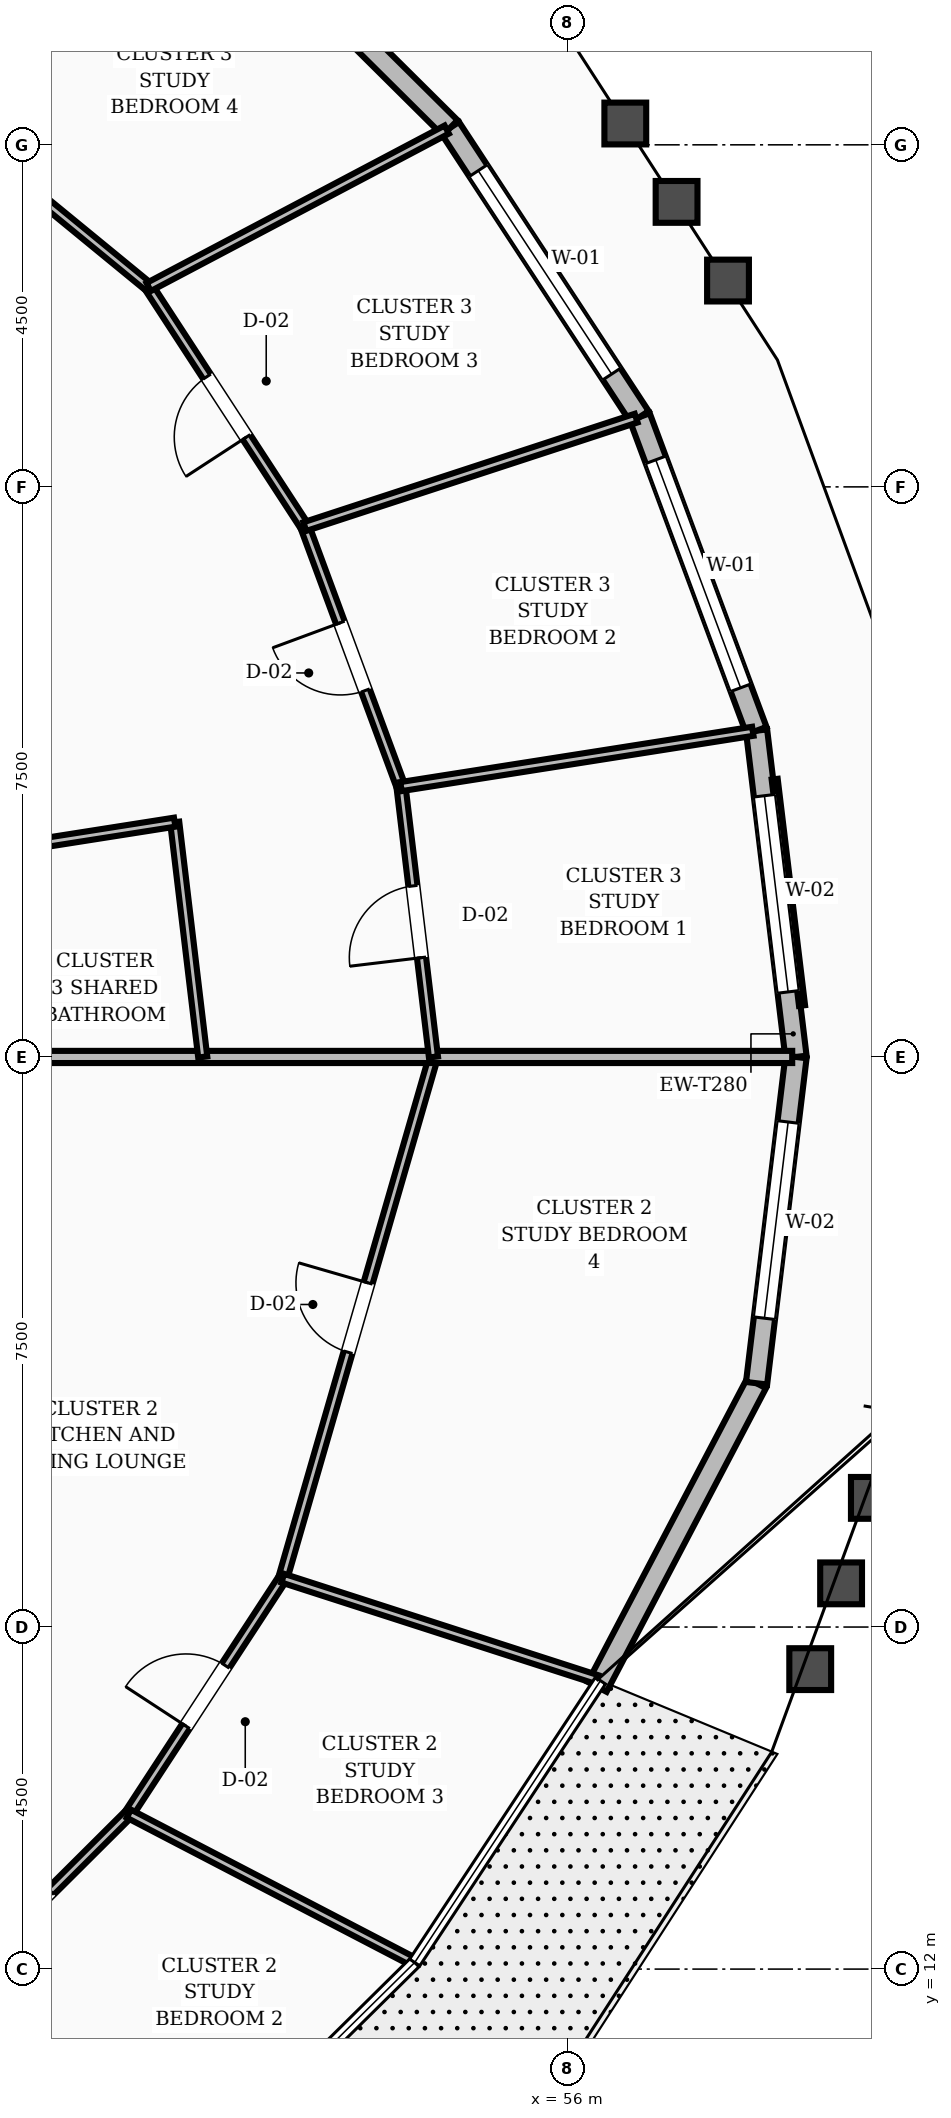
"""IFC4 building model, lengths in metres.
Left out: names, types, materials, properties, quantities, classifications, styles, units other than length and angle.
Written with IfcOpenShell. Run it as: python <this file> out.ifc"""

import sys

from ifc_helpers import new_model, si_unit, direction, frame, frame_2d, origin, place, context, subcontext, project, spatial, rectangle, extrude, element, fill, save


model = new_model("IFC4")
c1 = context("Model", 3, precision=1e-05, world=origin(), true_north=direction((0.0, 1.0)))
c2 = subcontext(c1, "Body", "Model", "MODEL_VIEW")
j1 = project(units=[si_unit("LENGTHUNIT", "METRE"), si_unit("PLANEANGLEUNIT", "RADIAN")], contexts=[c1])
p1 = place(None, origin())
s1 = spatial("IfcSite", under=j1, at=p1, CompositionType="ELEMENT")
p2 = place(p1, origin())
s2 = spatial("IfcBuilding", under=s1, at=p2, CompositionType="ELEMENT")
p3 = place(p2, frame((0.0, 0.0, 73.6)))
s3 = spatial("IfcBuildingStorey", under=s2, at=p3, CompositionType="ELEMENT", Elevation=73.6)
p4 = place(p3, frame((59.002, 24.0, 0.0), z_axis=(0.0, 0.0, 1.0), x_axis=(-0.119989041881, 0.992775216164, 0.0)))
e1 = element("IfcWall", 1, at=p4, inside=s3, PredefinedType="STANDARD", context=c2, shape_type="SweptSolid", body=[
    extrude(rectangle(XDim=4.324, YDim=0.28, at=frame_2d((2.162, 0.0))), origin(), (0.0, 0.0, 1.0), 2.71),
])
p5 = place(p4, frame((0.862, 0.0, 0.8)))
e2 = element("IfcOpeningElement", 2, at=p5, cuts=e1, PredefinedType="OPENING", context=c2, shape_type="SweptSolid", body=[
    extrude(rectangle(XDim=2.6, YDim=1.65, at=frame_2d((1.3, 0.825))), frame((0.0, 0.15, 0.0), z_axis=(0.0, -1.0, 0.0), x_axis=(1.0, 0.0, 0.0)), (0.0, 0.0, 1.0), 0.3),
])
p6 = place(p3, frame((58.484, 28.292, 0.0), z_axis=(0.0, 0.0, 1.0), x_axis=(-0.348899033007, 0.937160319672, 0.0)))
e3 = element("IfcWall", 3, at=p6, inside=s3, PredefinedType="STANDARD", context=c2, shape_type="SweptSolid", body=[
    extrude(rectangle(XDim=4.404, YDim=0.28, at=frame_2d((2.202, 0.0))), origin(), (0.0, 0.0, 1.0), 2.71),
])
p7 = place(p6, frame((0.602, 0.0, 0.8)))
e4 = element("IfcOpeningElement", 4, at=p7, cuts=e3, PredefinedType="OPENING", context=c2, shape_type="SweptSolid", body=[
    extrude(rectangle(XDim=3.2, YDim=1.65, at=frame_2d((1.6, 0.825))), frame((0.0, 0.15, 0.0), z_axis=(0.0, -1.0, 0.0), x_axis=(1.0, 0.0, 0.0)), (0.0, 0.0, 1.0), 0.3),
])
p8 = place(p3, frame((56.947, 32.42, 0.0), z_axis=(0.0, 0.0, 1.0), x_axis=(-0.548505219405, 0.836147130765, 0.0)))
e5 = element("IfcWall", 5, at=p8, inside=s3, PredefinedType="STANDARD", context=c2, shape_type="SweptSolid", body=[
    extrude(rectangle(XDim=4.549, YDim=0.28, at=frame_2d((2.275, 0.0))), origin(), (0.0, 0.0, 1.0), 2.71),
])
p9 = place(p8, frame((0.675, 0.0, 0.8)))
e6 = element("IfcOpeningElement", 6, at=p9, cuts=e5, PredefinedType="OPENING", context=c2, shape_type="SweptSolid", body=[
    extrude(rectangle(XDim=3.2, YDim=1.65, at=frame_2d((1.6, 0.825))), frame((0.0, 0.15, 0.0), z_axis=(0.0, -1.0, 0.0), x_axis=(1.0, 0.0, 0.0)), (0.0, 0.0, 1.0), 0.3),
])
p10 = place(p3, frame((54.452, 36.224, 0.0), z_axis=(0.0, 0.0, 1.0), x_axis=(-0.709630207161, 0.704574317645, 0.0)))
e7 = element("IfcWall", 7, at=p10, inside=s3, PredefinedType="STANDARD", context=c2, shape_type="SweptSolid", body=[
    extrude(rectangle(XDim=4.732, YDim=0.28, at=frame_2d((2.366, 0.0))), origin(), (0.0, 0.0, 1.0), 2.71),
])
p11 = place(p3, frame((56.387, 15.713, 0.0), z_axis=(0.0, 0.0, 1.0), x_axis=(0.464789355362, 0.885421286813, 0.0)))
e8 = element("IfcWall", 8, at=p11, inside=s3, PredefinedType="STANDARD", context=c2, shape_type="SweptSolid", body=[
    extrude(rectangle(XDim=4.511, YDim=0.28, at=frame_2d((2.256, 0.0))), origin(), (0.0, 0.0, 1.0), 2.71),
])
p12 = place(p3, frame((58.484, 19.708, 0.0), z_axis=(0.0, 0.0, 1.0), x_axis=(0.119989041881, 0.992775216164, 0.0)))
e9 = element("IfcWall", 9, at=p12, inside=s3, PredefinedType="STANDARD", context=c2, shape_type="SweptSolid", body=[
    extrude(rectangle(XDim=4.324, YDim=0.28, at=frame_2d((2.162, 0.0))), origin(), (0.0, 0.0, 1.0), 2.71),
])
p13 = place(p12, frame((0.862, 0.0, 0.8)))
e10 = element("IfcOpeningElement", 10, at=p13, cuts=e9, PredefinedType="OPENING", context=c2, shape_type="SweptSolid", body=[
    extrude(rectangle(XDim=2.6, YDim=1.65, at=frame_2d((1.3, 0.825))), frame((0.0, 0.15, 0.0), z_axis=(0.0, -1.0, 0.0), x_axis=(1.0, 0.0, 0.0)), (0.0, 0.0, 1.0), 0.3),
])
p14 = place(p3, frame((47.499, 11.33, 0.0), z_axis=(0.0, 0.0, 1.0), x_axis=(0.708501340015, 0.705709466563, 0.0)))
e11 = element("IfcWall", 11, at=p14, inside=s3, PredefinedType="PARTITIONING", context=c2, shape_type="SweptSolid", body=[
    extrude(rectangle(XDim=3.848, YDim=0.12, at=frame_2d((1.924, 0.0))), origin(), (0.0, 0.0, 1.0), 2.71),
])
p15 = place(p14, frame((1.449, 0.0, 0.0)))
e12 = element("IfcOpeningElement", 12, at=p15, cuts=e11, PredefinedType="OPENING", context=c2, shape_type="SweptSolid", body=[
    extrude(rectangle(XDim=0.95, YDim=2.1, at=frame_2d((0.475, 1.05))), frame((0.0, 0.07, 0.0), z_axis=(0.0, -1.0, 0.0), x_axis=(1.0, 0.0, 0.0)), (0.0, 0.0, 1.0), 0.14),
])
p16 = place(p3, frame((47.499, 11.33, 0.0), z_axis=(0.0, 0.0, 1.0), x_axis=(0.788892410808, -0.614531337012, 0.0)))
e13 = element("IfcWall", 13, at=p16, inside=s3, PredefinedType="PARTITIONING", context=c2, shape_type="SweptSolid", body=[
    extrude(rectangle(XDim=4.005, YDim=0.12, at=frame_2d((2.002, 0.0))), origin(), (0.0, 0.0, 1.0), 2.71),
])
p17 = place(p3, frame((50.225, 14.045, 0.0), z_axis=(0.0, 0.0, 1.0), x_axis=(0.547219150068, 0.836989367793, 0.0)))
e14 = element("IfcWall", 14, at=p17, inside=s3, PredefinedType="PARTITIONING", context=c2, shape_type="SweptSolid", body=[
    extrude(rectangle(XDim=3.701, YDim=0.12, at=frame_2d((1.851, 0.0))), origin(), (0.0, 0.0, 1.0), 2.71),
])
p18 = place(p17, frame((1.375, 0.0, 0.0)))
e15 = element("IfcOpeningElement", 15, at=p18, cuts=e14, PredefinedType="OPENING", context=c2, shape_type="SweptSolid", body=[
    extrude(rectangle(XDim=0.95, YDim=2.1, at=frame_2d((0.475, 1.05))), frame((0.0, 0.07, 0.0), z_axis=(0.0, -1.0, 0.0), x_axis=(1.0, 0.0, 0.0)), (0.0, 0.0, 1.0), 0.14),
])
p19 = place(p3, frame((50.225, 14.045, 0.0), z_axis=(0.0, 0.0, 1.0), x_axis=(0.88702496615, -0.461721463034, 0.0)))
e16 = element("IfcWall", 16, at=p19, inside=s3, PredefinedType="PARTITIONING", context=c2, shape_type="SweptSolid", body=[
    extrude(rectangle(XDim=4.19, YDim=0.12, at=frame_2d((2.095, 0.0))), origin(), (0.0, 0.0, 1.0), 2.71),
])
p20 = place(p3, frame((52.25, 17.143, 0.0), z_axis=(0.0, 0.0, 1.0), x_axis=(0.277696791091, 0.960668773417, 0.0)))
e17 = element("IfcWall", 17, at=p20, inside=s3, PredefinedType="PARTITIONING", context=c2, shape_type="SweptSolid", body=[
    extrude(rectangle(XDim=7.138, YDim=0.12, at=frame_2d((3.569, 0.0))), origin(), (0.0, 0.0, 1.0), 2.71),
])
p21 = place(p20, frame((3.094, 0.0, 0.0)))
e18 = element("IfcOpeningElement", 18, at=p21, cuts=e17, PredefinedType="OPENING", context=c2, shape_type="SweptSolid", body=[
    extrude(rectangle(XDim=0.95, YDim=2.1, at=frame_2d((0.475, 1.05))), frame((0.0, 0.07, 0.0), z_axis=(0.0, -1.0, 0.0), x_axis=(1.0, 0.0, 0.0)), (0.0, 0.0, 1.0), 0.14),
])
p22 = place(p3, frame((52.25, 17.143, 0.0), z_axis=(0.0, 0.0, 1.0), x_axis=(0.951692715454, -0.307052072704, 0.0)))
e19 = element("IfcWall", 19, at=p22, inside=s3, PredefinedType="PARTITIONING", context=c2, shape_type="SweptSolid", body=[
    extrude(rectangle(XDim=4.341, YDim=0.12, at=frame_2d((2.171, 0.0))), origin(), (0.0, 0.0, 1.0), 2.71),
])
p23 = place(p3, frame((48.162, 24.0, 0.0), z_axis=(0.0, 0.0, 1.0), x_axis=(1.0, 0.0, 0.0)))
e20 = element("IfcWall", 20, at=p23, inside=s3, PredefinedType="SOLIDWALL", context=c2, shape_type="SweptSolid", body=[
    extrude(rectangle(XDim=10.79, YDim=0.16, at=frame_2d((5.395, 0.0))), origin(), (0.0, 0.0, 1.0), 2.71),
])
p24 = place(p3, frame((51.197, 24.0, 0.0), z_axis=(0.0, 0.0, 1.0), x_axis=(-0.118507685269, 0.992953135114, 0.0)))
e21 = element("IfcWall", 21, at=p24, inside=s3, PredefinedType="PARTITIONING", context=c2, shape_type="SweptSolid", body=[
    extrude(rectangle(XDim=3.111, YDim=0.12, at=frame_2d((1.555, 0.0))), origin(), (0.0, 0.0, 1.0), 2.71),
])
p25 = place(p3, frame((47.852, 26.621, 0.0), z_axis=(0.0, 0.0, 1.0), x_axis=(0.987867184376, 0.15530108188, 0.0)))
e22 = element("IfcWall", 22, at=p25, inside=s3, PredefinedType="PARTITIONING", context=c2, shape_type="SweptSolid", body=[
    extrude(rectangle(XDim=3.014, YDim=0.12, at=frame_2d((1.507, 0.0))), origin(), (0.0, 0.0, 1.0), 2.71),
])
p26 = place(p25, frame((0.44, 0.0, 0.0)))
e23 = element("IfcOpeningElement", 23, at=p26, cuts=e22, PredefinedType="OPENING", context=c2, shape_type="SweptSolid", body=[
    extrude(rectangle(XDim=0.86, YDim=2.1, at=frame_2d((0.43, 1.05))), frame((0.0, 0.07, 0.0), z_axis=(0.0, -1.0, 0.0), x_axis=(1.0, 0.0, 0.0)), (0.0, 0.0, 1.0), 0.14),
])
p27 = place(p3, frame((54.233, 24.0, 0.0), z_axis=(0.0, 0.0, 1.0), x_axis=(-0.11926077216, 0.992862965481, 0.0)))
e24 = element("IfcWall", 24, at=p27, inside=s3, PredefinedType="PARTITIONING", context=c2, shape_type="SweptSolid", body=[
    extrude(rectangle(XDim=3.583, YDim=0.12, at=frame_2d((1.791, 0.0))), origin(), (0.0, 0.0, 1.0), 2.71),
])
p28 = place(p27, frame((1.316, 0.0, 0.0)))
e25 = element("IfcOpeningElement", 25, at=p28, cuts=e24, PredefinedType="OPENING", context=c2, shape_type="SweptSolid", body=[
    extrude(rectangle(XDim=0.95, YDim=2.1, at=frame_2d((0.475, 1.05))), frame((0.0, 0.07, 0.0), z_axis=(0.0, -1.0, 0.0), x_axis=(1.0, 0.0, 0.0)), (0.0, 0.0, 1.0), 0.14),
])
p29 = place(p3, frame((53.805, 27.557, 0.0), z_axis=(0.0, 0.0, 1.0), x_axis=(-0.346908777405, 0.937898875231, 0.0)))
e26 = element("IfcWall", 26, at=p29, inside=s3, PredefinedType="PARTITIONING", context=c2, shape_type="SweptSolid", body=[
    extrude(rectangle(XDim=3.647, YDim=0.12, at=frame_2d((1.823, 0.0))), origin(), (0.0, 0.0, 1.0), 2.71),
])
p30 = place(p29, frame((1.348, 0.0, 0.0)))
e27 = element("IfcOpeningElement", 27, at=p30, cuts=e26, PredefinedType="OPENING", context=c2, shape_type="SweptSolid", body=[
    extrude(rectangle(XDim=0.95, YDim=2.1, at=frame_2d((0.475, 1.05))), frame((0.0, 0.07, 0.0), z_axis=(0.0, -1.0, 0.0), x_axis=(1.0, 0.0, 0.0)), (0.0, 0.0, 1.0), 0.14),
])
p31 = place(p3, frame((53.805, 27.557, 0.0), z_axis=(0.0, 0.0, 1.0), x_axis=(0.98786330909, 0.155325730492, 0.0)))
e28 = element("IfcWall", 28, at=p31, inside=s3, PredefinedType="PARTITIONING", context=c2, shape_type="SweptSolid", body=[
    extrude(rectangle(XDim=4.686, YDim=0.12, at=frame_2d((2.343, 0.0))), origin(), (0.0, 0.0, 1.0), 2.71),
])
p32 = place(p3, frame((52.54, 30.977, 0.0), z_axis=(0.0, 0.0, 1.0), x_axis=(-0.546030238515, 0.837765467555, 0.0)))
e29 = element("IfcWall", 29, at=p32, inside=s3, PredefinedType="PARTITIONING", context=c2, shape_type="SweptSolid", body=[
    extrude(rectangle(XDim=3.762, YDim=0.12, at=frame_2d((1.881, 0.0))), origin(), (0.0, 0.0, 1.0), 2.71),
])
p33 = place(p32, frame((1.406, 0.0, 0.0)))
e30 = element("IfcOpeningElement", 30, at=p33, cuts=e29, PredefinedType="OPENING", context=c2, shape_type="SweptSolid", body=[
    extrude(rectangle(XDim=0.95, YDim=2.1, at=frame_2d((0.475, 1.05))), frame((0.0, 0.07, 0.0), z_axis=(0.0, -1.0, 0.0), x_axis=(1.0, 0.0, 0.0)), (0.0, 0.0, 1.0), 0.14),
])
p34 = place(p3, frame((52.54, 30.977, 0.0), z_axis=(0.0, 0.0, 1.0), x_axis=(0.950372809116, 0.311113361483, 0.0)))
e31 = element("IfcWall", 31, at=p34, inside=s3, PredefinedType="PARTITIONING", context=c2, shape_type="SweptSolid", body=[
    extrude(rectangle(XDim=4.587, YDim=0.12, at=frame_2d((2.293, 0.0))), origin(), (0.0, 0.0, 1.0), 2.71),
])
p35 = place(p3, frame((50.486, 34.129, 0.0), z_axis=(0.0, 0.0, 1.0), x_axis=(-0.773245155234, 0.634107191181, 0.0)))
e32 = element("IfcWall", 32, at=p35, inside=s3, PredefinedType="PARTITIONING", context=c2, shape_type="SweptSolid", body=[
    extrude(rectangle(XDim=7.933, YDim=0.12, at=frame_2d((3.966, 0.0))), origin(), (0.0, 0.0, 1.0), 2.71),
])
p36 = place(p35, frame((3.491, 0.0, 0.0)))
e33 = element("IfcOpeningElement", 33, at=p36, cuts=e32, PredefinedType="OPENING", context=c2, shape_type="SweptSolid", body=[
    extrude(rectangle(XDim=0.95, YDim=2.1, at=frame_2d((0.475, 1.05))), frame((0.0, 0.07, 0.0), z_axis=(0.0, -1.0, 0.0), x_axis=(1.0, 0.0, 0.0)), (0.0, 0.0, 1.0), 0.14),
])
p37 = place(p3, frame((50.486, 34.129, 0.0), z_axis=(0.0, 0.0, 1.0), x_axis=(0.88426415874, 0.466987042184, 0.0)))
e34 = element("IfcWall", 34, at=p37, inside=s3, PredefinedType="PARTITIONING", context=c2, shape_type="SweptSolid", body=[
    extrude(rectangle(XDim=4.435, YDim=0.12, at=frame_2d((2.217, 0.0))), origin(), (0.0, 0.0, 1.0), 2.71),
])
p38 = place(p5, origin())
e35 = element("IfcWindow", 35, at=p38, inside=s3, PartitioningType="SINGLE_PANEL", PredefinedType="WINDOW", context=c2, shape_type="SweptSolid", body=[
    extrude(rectangle(XDim=2.6, YDim=1.65, at=frame_2d((1.3, 0.825))), frame((0.0, 0.03, 0.0), z_axis=(0.0, -1.0, 0.0), x_axis=(1.0, 0.0, 0.0)), (0.0, 0.0, 1.0), 0.06),
])
fill(e2, e35)
p39 = place(p7, origin())
e36 = element("IfcWindow", 36, at=p39, inside=s3, PartitioningType="SINGLE_PANEL", PredefinedType="WINDOW", context=c2, shape_type="SweptSolid", body=[
    extrude(rectangle(XDim=3.2, YDim=1.65, at=frame_2d((1.6, 0.825))), frame((0.0, 0.03, 0.0), z_axis=(0.0, -1.0, 0.0), x_axis=(1.0, 0.0, 0.0)), (0.0, 0.0, 1.0), 0.06),
])
fill(e4, e36)
p40 = place(p9, origin())
e37 = element("IfcWindow", 37, at=p40, inside=s3, PartitioningType="SINGLE_PANEL", PredefinedType="WINDOW", context=c2, shape_type="SweptSolid", body=[
    extrude(rectangle(XDim=3.2, YDim=1.65, at=frame_2d((1.6, 0.825))), frame((0.0, 0.03, 0.0), z_axis=(0.0, -1.0, 0.0), x_axis=(1.0, 0.0, 0.0)), (0.0, 0.0, 1.0), 0.06),
])
fill(e6, e37)
p41 = place(p13, origin())
e38 = element("IfcWindow", 38, at=p41, inside=s3, PartitioningType="SINGLE_PANEL", PredefinedType="WINDOW", context=c2, shape_type="SweptSolid", body=[
    extrude(rectangle(XDim=2.6, YDim=1.65, at=frame_2d((1.3, 0.825))), frame((0.0, 0.03, 0.0), z_axis=(0.0, -1.0, 0.0), x_axis=(1.0, 0.0, 0.0)), (0.0, 0.0, 1.0), 0.06),
])
fill(e10, e38)
p42 = place(p18, origin())
e39 = element("IfcDoor", 39, at=p42, inside=s3, OperationType="SINGLE_SWING_LEFT", PredefinedType="DOOR", context=c2, shape_type="SweptSolid", body=[
    extrude(rectangle(XDim=0.95, YDim=2.1, at=frame_2d((0.475, 1.05))), frame((0.0, 0.025, 0.0), z_axis=(0.0, -1.0, 0.0), x_axis=(1.0, 0.0, 0.0)), (0.0, 0.0, 1.0), 0.05),
])
fill(e15, e39)
p43 = place(p21, origin())
e40 = element("IfcDoor", 40, at=p43, inside=s3, OperationType="SINGLE_SWING_RIGHT", PredefinedType="DOOR", context=c2, shape_type="SweptSolid", body=[
    extrude(rectangle(XDim=0.95, YDim=2.1, at=frame_2d((0.475, 1.05))), frame((0.0, 0.025, 0.0), z_axis=(0.0, -1.0, 0.0), x_axis=(1.0, 0.0, 0.0)), (0.0, 0.0, 1.0), 0.05),
])
fill(e18, e40)
p44 = place(p28, origin())
e41 = element("IfcDoor", 41, at=p44, inside=s3, OperationType="SINGLE_SWING_LEFT", PredefinedType="DOOR", context=c2, shape_type="SweptSolid", body=[
    extrude(rectangle(XDim=0.95, YDim=2.1, at=frame_2d((0.475, 1.05))), frame((0.0, 0.025, 0.0), z_axis=(0.0, -1.0, 0.0), x_axis=(1.0, 0.0, 0.0)), (0.0, 0.0, 1.0), 0.05),
])
fill(e25, e41)
p45 = place(p30, origin())
e42 = element("IfcDoor", 42, at=p45, inside=s3, OperationType="SINGLE_SWING_RIGHT", PredefinedType="DOOR", context=c2, shape_type="SweptSolid", body=[
    extrude(rectangle(XDim=0.95, YDim=2.1, at=frame_2d((0.475, 1.05))), frame((0.0, 0.025, 0.0), z_axis=(0.0, -1.0, 0.0), x_axis=(1.0, 0.0, 0.0)), (0.0, 0.0, 1.0), 0.05),
])
fill(e27, e42)
p46 = place(p33, origin())
e43 = element("IfcDoor", 43, at=p46, inside=s3, OperationType="SINGLE_SWING_LEFT", PredefinedType="DOOR", context=c2, shape_type="SweptSolid", body=[
    extrude(rectangle(XDim=0.95, YDim=2.1, at=frame_2d((0.475, 1.05))), frame((0.0, 0.025, 0.0), z_axis=(0.0, -1.0, 0.0), x_axis=(1.0, 0.0, 0.0)), (0.0, 0.0, 1.0), 0.05),
])
fill(e30, e43)
save(model, sys.argv[1])
